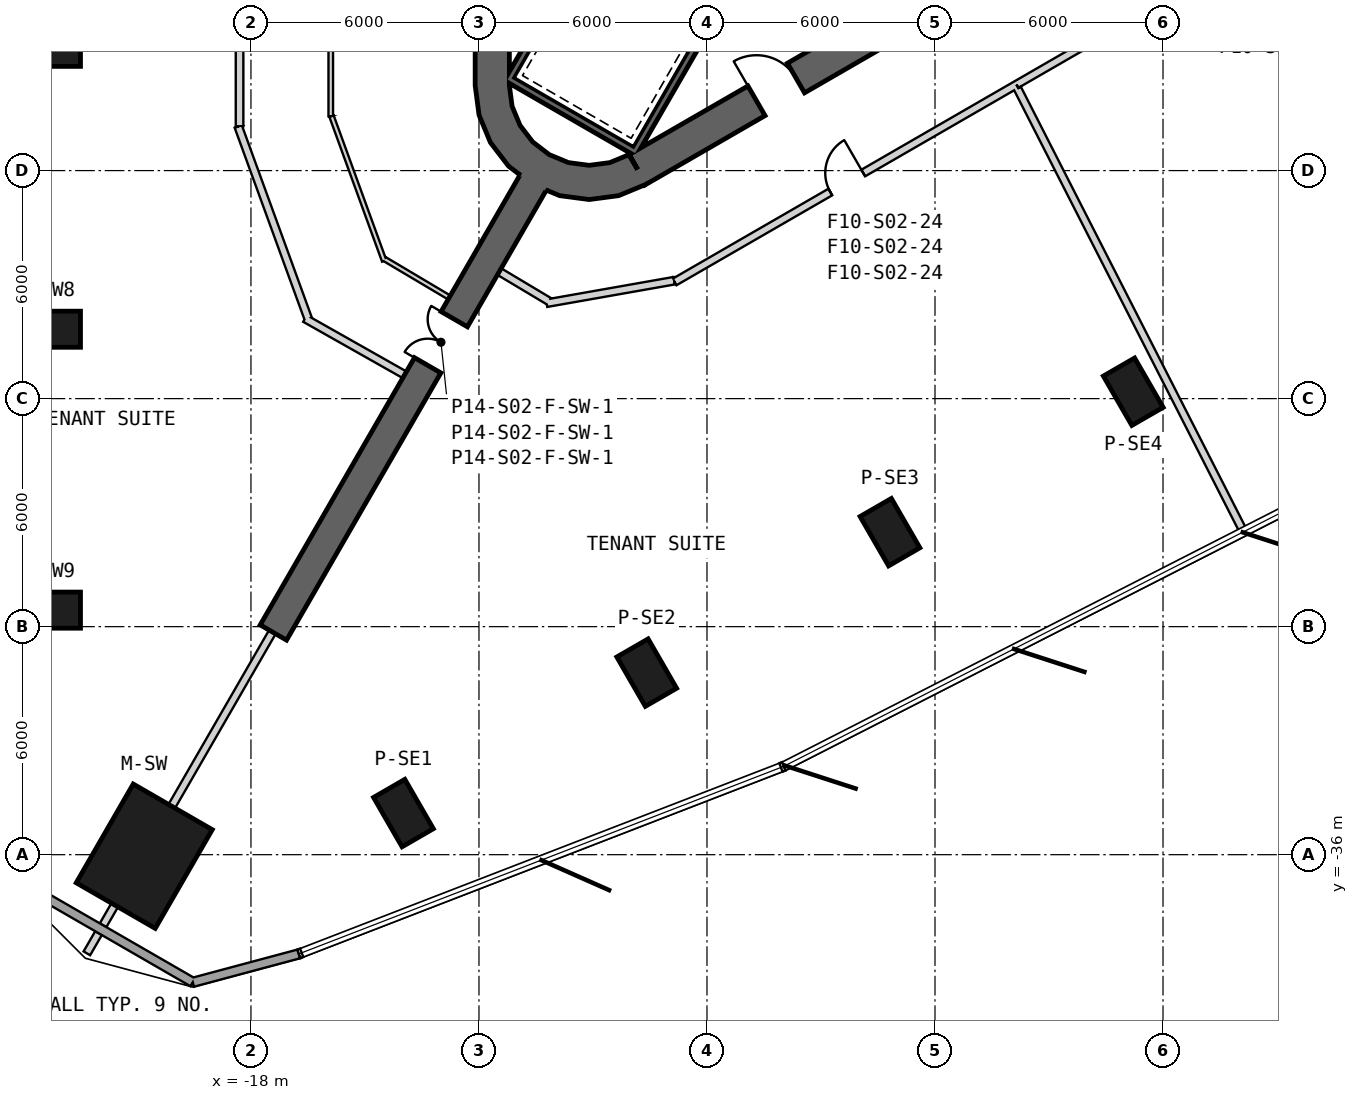
"""IFC4 building model, lengths in metres.
Left out: names, types, materials, properties, quantities, classifications, styles, units other than length and angle.
Written with IfcOpenShell. Run it as: python <this file> out.ifc"""

import sys

from ifc_helpers import new_model, si_unit, direction, frame, frame_2d, origin, origin_2d, place, context, subcontext, project, spatial, polyline, rectangle, outline, extrude, element, fill, save


model = new_model("IFC4")
c1 = context("Model", 3, precision=1e-05, world=origin(), true_north=direction((0.0, 1.0)))
c2 = subcontext(c1, "Body", "Model", "MODEL_VIEW")
j1 = project(units=[si_unit("LENGTHUNIT", "METRE"), si_unit("PLANEANGLEUNIT", "RADIAN")], contexts=[c1])
p1 = place(None, origin())
s1 = spatial("IfcSite", under=j1, at=p1, CompositionType="ELEMENT")
p2 = place(p1, origin())
s2 = spatial("IfcBuilding", under=s1, at=p2, CompositionType="ELEMENT")
p3 = place(p2, frame((0.0, 0.0, 70.1)))
s3 = spatial("IfcBuildingStorey", under=s2, at=p3, CompositionType="ELEMENT", Elevation=70.1)
p4 = place(p3, frame((-20.808, -36.041, 0.0), z_axis=(0.0, 0.0, 1.0), x_axis=(-0.5, -0.866025403784, 0.0)))
e1 = element("IfcColumn", 1, at=p4, inside=s3, PredefinedType="COLUMN", context=c2, shape_type="SweptSolid", body=[
    extrude(rectangle(XDim=3.0, YDim=2.4, at=origin_2d()), origin(), (0.0, 0.0, 1.0), 4.1),
])
for number, where, z_axis, x_axis in (
    (2, (-23.236, -14.783, 0.0), (0.0, 0.0, 1.0), (-1.0, 0.0, 0.0)),
    (3, (-23.236, -22.174, 0.0), (0.0, 0.0, 1.0), (-1.0, 0.0, 0.0)),
    (4, (-23.236, -29.566, 0.0), (0.0, 0.0, 1.0), (-1.0, 0.0, 0.0)),
    (5, (-13.987, -34.906, 0.0), (0.0, 0.0, 1.0), (0.5, -0.866, 0.0)),
    (6, (-7.586, -31.21, 0.0), (0.0, 0.0, 1.0), (0.5, -0.866, 0.0)),
    (7, (-1.185, -27.514, 0.0), (0.0, 0.0, 1.0), (0.5, -0.866, 0.0)),
    (8, (5.217, -23.818, 0.0), (0.0, 0.0, 1.0), (0.5, -0.866, 0.0)),
):
    element("IfcColumn", number, at=place(p3, frame(where, z_axis=z_axis, x_axis=x_axis)), inside=s3, PredefinedType="COLUMN", context=c2, shape_type="SweptSolid", body=[
        extrude(rectangle(XDim=1.5, YDim=0.95, at=origin_2d()), origin(), (0.0, 0.0, 1.0), 4.1),
    ])
p5 = place(p3, frame((-11.65, 15.762, 0.0), z_axis=(0.0, 0.0, 1.0), x_axis=(0.0, -1.0, 0.0)))
e9 = element("IfcWall", 9, at=p5, inside=s3, PredefinedType="SHEAR", context=c2, shape_type="SweptSolid", body=[
    extrude(rectangle(XDim=31.523, YDim=0.9, at=frame_2d((15.762, 0.0))), origin(), (0.0, 0.0, 1.0), 4.1),
])
p6 = place(p5, frame((7.062, 0.0, 0.0)))
e10 = element("IfcOpeningElement", 10, at=p6, cuts=e9, PredefinedType="OPENING", context=c2, shape_type="SweptSolid", body=[
    extrude(rectangle(XDim=1.2, YDim=2.4, at=frame_2d((0.6, 1.2))), frame((0.0, 0.46, 0.0), z_axis=(0.0, -1.0, 0.0), x_axis=(1.0, 0.0, 0.0)), (0.0, 0.0, 1.0), 0.92),
])
p7 = place(p5, frame((9.762, 0.0, 0.0)))
e11 = element("IfcOpeningElement", 11, at=p7, cuts=e9, PredefinedType="OPENING", context=c2, shape_type="SweptSolid", body=[
    extrude(rectangle(XDim=1.2, YDim=2.4, at=frame_2d((0.6, 1.2))), frame((0.0, 0.46, 0.0), z_axis=(0.0, -1.0, 0.0), x_axis=(1.0, 0.0, 0.0)), (0.0, 0.0, 1.0), 0.92),
])
p8 = place(p5, frame((12.462, 0.0, 0.0)))
e12 = element("IfcOpeningElement", 12, at=p8, cuts=e9, PredefinedType="OPENING", context=c2, shape_type="SweptSolid", body=[
    extrude(rectangle(XDim=1.2, YDim=2.4, at=frame_2d((0.6, 1.2))), frame((0.0, 0.46, 0.0), z_axis=(0.0, -1.0, 0.0), x_axis=(1.0, 0.0, 0.0)), (0.0, 0.0, 1.0), 0.92),
])
p9 = place(p5, frame((15.162, 0.0, 0.0)))
e13 = element("IfcOpeningElement", 13, at=p9, cuts=e9, PredefinedType="OPENING", context=c2, shape_type="SweptSolid", body=[
    extrude(rectangle(XDim=1.2, YDim=2.4, at=frame_2d((0.6, 1.2))), frame((0.0, 0.46, 0.0), z_axis=(0.0, -1.0, 0.0), x_axis=(1.0, 0.0, 0.0)), (0.0, 0.0, 1.0), 0.92),
])
p10 = place(p5, frame((17.862, 0.0, 0.0)))
e14 = element("IfcOpeningElement", 14, at=p10, cuts=e9, PredefinedType="OPENING", context=c2, shape_type="SweptSolid", body=[
    extrude(rectangle(XDim=1.2, YDim=2.4, at=frame_2d((0.6, 1.2))), frame((0.0, 0.46, 0.0), z_axis=(0.0, -1.0, 0.0), x_axis=(1.0, 0.0, 0.0)), (0.0, 0.0, 1.0), 0.92),
])
p11 = place(p5, frame((20.562, 0.0, 0.0)))
e15 = element("IfcOpeningElement", 15, at=p11, cuts=e9, PredefinedType="OPENING", context=c2, shape_type="SweptSolid", body=[
    extrude(rectangle(XDim=1.2, YDim=2.4, at=frame_2d((0.6, 1.2))), frame((0.0, 0.46, 0.0), z_axis=(0.0, -1.0, 0.0), x_axis=(1.0, 0.0, 0.0)), (0.0, 0.0, 1.0), 0.92),
])
p12 = place(p5, frame((23.262, 0.0, 0.0)))
e16 = element("IfcOpeningElement", 16, at=p12, cuts=e9, PredefinedType="OPENING", context=c2, shape_type="SweptSolid", body=[
    extrude(rectangle(XDim=1.2, YDim=2.4, at=frame_2d((0.6, 1.2))), frame((0.0, 0.46, 0.0), z_axis=(0.0, -1.0, 0.0), x_axis=(1.0, 0.0, 0.0)), (0.0, 0.0, 1.0), 0.92),
])
p13 = place(p5, frame((3.612, 0.0, 0.0)))
e17 = element("IfcOpeningElement", 17, at=p13, cuts=e9, PredefinedType="OPENING", context=c2, shape_type="SweptSolid", body=[
    extrude(rectangle(XDim=1.2, YDim=2.4, at=frame_2d((0.6, 1.2))), frame((0.0, 0.46, 0.0), z_axis=(0.0, -1.0, 0.0), x_axis=(1.0, 0.0, 0.0)), (0.0, 0.0, 1.0), 0.92),
])
p14 = place(p5, frame((26.712, 0.0, 0.0)))
e18 = element("IfcOpeningElement", 18, at=p14, cuts=e9, PredefinedType="OPENING", context=c2, shape_type="SweptSolid", body=[
    extrude(rectangle(XDim=1.2, YDim=2.4, at=frame_2d((0.6, 1.2))), frame((0.0, 0.46, 0.0), z_axis=(0.0, -1.0, 0.0), x_axis=(1.0, 0.0, 0.0)), (0.0, 0.0, 1.0), 0.92),
])
p15 = place(p3, frame((-7.825, -17.97, 0.0), z_axis=(0.0, 0.0, 1.0), x_axis=(0.866028369851, 0.499994862586, 0.0)))
e19 = element("IfcWall", 19, at=p15, inside=s3, PredefinedType="SHEAR", context=c2, shape_type="SweptSolid", body=[
    extrude(rectangle(XDim=31.523, YDim=0.9, at=frame_2d((15.762, 0.0))), origin(), (0.0, 0.0, 1.0), 4.1),
])
p16 = place(p15, frame((7.062, 0.0, 0.0)))
e20 = element("IfcOpeningElement", 20, at=p16, cuts=e19, PredefinedType="OPENING", context=c2, shape_type="SweptSolid", body=[
    extrude(rectangle(XDim=1.2, YDim=2.4, at=frame_2d((0.6, 1.2))), frame((0.0, 0.46, 0.0), z_axis=(0.0, -1.0, 0.0), x_axis=(1.0, 0.0, 0.0)), (0.0, 0.0, 1.0), 0.92),
])
p17 = place(p15, frame((9.762, 0.0, 0.0)))
e21 = element("IfcOpeningElement", 21, at=p17, cuts=e19, PredefinedType="OPENING", context=c2, shape_type="SweptSolid", body=[
    extrude(rectangle(XDim=1.2, YDim=2.4, at=frame_2d((0.6, 1.2))), frame((0.0, 0.46, 0.0), z_axis=(0.0, -1.0, 0.0), x_axis=(1.0, 0.0, 0.0)), (0.0, 0.0, 1.0), 0.92),
])
p18 = place(p15, frame((12.462, 0.0, 0.0)))
e22 = element("IfcOpeningElement", 22, at=p18, cuts=e19, PredefinedType="OPENING", context=c2, shape_type="SweptSolid", body=[
    extrude(rectangle(XDim=1.2, YDim=2.4, at=frame_2d((0.6, 1.2))), frame((0.0, 0.46, 0.0), z_axis=(0.0, -1.0, 0.0), x_axis=(1.0, 0.0, 0.0)), (0.0, 0.0, 1.0), 0.92),
])
p19 = place(p15, frame((15.162, 0.0, 0.0)))
e23 = element("IfcOpeningElement", 23, at=p19, cuts=e19, PredefinedType="OPENING", context=c2, shape_type="SweptSolid", body=[
    extrude(rectangle(XDim=1.2, YDim=2.4, at=frame_2d((0.6, 1.2))), frame((0.0, 0.46, 0.0), z_axis=(0.0, -1.0, 0.0), x_axis=(1.0, 0.0, 0.0)), (0.0, 0.0, 1.0), 0.92),
])
p20 = place(p15, frame((17.862, 0.0, 0.0)))
e24 = element("IfcOpeningElement", 24, at=p20, cuts=e19, PredefinedType="OPENING", context=c2, shape_type="SweptSolid", body=[
    extrude(rectangle(XDim=1.2, YDim=2.4, at=frame_2d((0.6, 1.2))), frame((0.0, 0.46, 0.0), z_axis=(0.0, -1.0, 0.0), x_axis=(1.0, 0.0, 0.0)), (0.0, 0.0, 1.0), 0.92),
])
p21 = place(p15, frame((20.562, 0.0, 0.0)))
e25 = element("IfcOpeningElement", 25, at=p21, cuts=e19, PredefinedType="OPENING", context=c2, shape_type="SweptSolid", body=[
    extrude(rectangle(XDim=1.2, YDim=2.4, at=frame_2d((0.6, 1.2))), frame((0.0, 0.46, 0.0), z_axis=(0.0, -1.0, 0.0), x_axis=(1.0, 0.0, 0.0)), (0.0, 0.0, 1.0), 0.92),
])
p22 = place(p15, frame((26.712, 0.0, 0.0)))
e26 = element("IfcOpeningElement", 26, at=p22, cuts=e19, PredefinedType="OPENING", context=c2, shape_type="SweptSolid", body=[
    extrude(rectangle(XDim=1.2, YDim=2.4, at=frame_2d((0.6, 1.2))), frame((0.0, 0.46, 0.0), z_axis=(0.0, -1.0, 0.0), x_axis=(1.0, 0.0, 0.0)), (0.0, 0.0, 1.0), 0.92),
])
p23 = place(p15, frame((3.612, 0.0, 0.0)))
e27 = element("IfcOpeningElement", 27, at=p23, cuts=e19, PredefinedType="OPENING", context=c2, shape_type="SweptSolid", body=[
    extrude(rectangle(XDim=1.2, YDim=2.4, at=frame_2d((0.6, 1.2))), frame((0.0, 0.46, 0.0), z_axis=(0.0, -1.0, 0.0), x_axis=(1.0, 0.0, 0.0)), (0.0, 0.0, 1.0), 0.92),
])
p24 = place(p3, origin())
e28 = element("IfcWall", 28, at=p24, inside=s3, PredefinedType="SHEAR", context=c2, shape_type="SweptSolid", body=[
    extrude(outline(polyline([(-12.1, -15.762), (-11.998, -16.538), (-11.698, -17.262), (-11.221, -17.883), (-10.6, -18.36), (-9.876, -18.659), (-9.1, -18.762), (-8.323, -18.659), (-7.6, -18.36), (-8.05, -17.58), (-8.556, -17.79), (-9.1, -17.862), (-9.644, -17.79), (-10.15, -17.58), (-10.585, -17.247), (-10.919, -16.812), (-11.128, -16.305), (-11.2, -15.762), (-12.1, -15.762)])), origin(), (0.0, 0.0, 1.0), 4.1),
])
p25 = place(p3, frame((-10.575, -18.316, 0.0), z_axis=(0.0, 0.0, 1.0), x_axis=(-0.499998162141, -0.86602646487, 0.0)))
e29 = element("IfcWall", 29, at=p25, inside=s3, PredefinedType="SHEAR", context=c2, shape_type="SweptSolid", body=[
    extrude(rectangle(XDim=13.669, YDim=0.8, at=frame_2d((6.835, 0.0))), origin(), (0.0, 0.0, 1.0), 4.1),
])
p26 = place(p25, frame((4.15, 0.0, 0.0)))
e30 = element("IfcOpeningElement", 30, at=p26, cuts=e29, PredefinedType="OPENING", context=c2, shape_type="SweptSolid", body=[
    extrude(rectangle(XDim=1.4, YDim=2.4, at=frame_2d((0.7, 1.2))), frame((0.0, 0.41, 0.0), z_axis=(0.0, -1.0, 0.0), x_axis=(1.0, 0.0, 0.0)), (0.0, 0.0, 1.0), 0.82),
])
p27 = place(p3, frame((-24.32, -36.593, 0.0), z_axis=(0.0, 0.0, 1.0), x_axis=(0.866017993231, -0.500012835235, 0.0)))
e31 = element("IfcWall", 31, at=p27, inside=s3, PredefinedType="SOLIDWALL", context=c2, shape_type="SweptSolid", body=[
    extrude(rectangle(XDim=5.531, YDim=0.24, at=frame_2d((2.766, 0.0))), origin(), (0.0, 0.0, 1.0), 3.8),
])
p28 = place(p3, frame((-19.53, -39.359, 0.0), z_axis=(0.0, 0.0, 1.0), x_axis=(0.965912964575, 0.258867040904, 0.0)))
e32 = element("IfcWall", 32, at=p28, inside=s3, PredefinedType="SOLIDWALL", context=c2, shape_type="SweptSolid", body=[
    extrude(rectangle(XDim=2.889, YDim=0.24, at=frame_2d((1.444, 0.0))), origin(), (0.0, 0.0, 1.0), 3.8),
])
p29 = place(p3, frame((-3.905, -10.563, -0.3), z_axis=(0.0, 0.0, 1.0), x_axis=(-0.500012932018, -0.866017937352, 0.0)))
e33 = element("IfcWall", 33, at=p29, inside=s3, PredefinedType="SHEAR", context=c2, shape_type="SweptSolid", body=[
    extrude(rectangle(XDim=8.1, YDim=0.2, at=frame_2d((4.05, 0.0))), origin(), (0.0, 0.0, 1.0), 4.1),
])
p30 = place(p3, frame((-11.282, -15.541, -0.3), z_axis=(0.0, 0.0, 1.0), x_axis=(0.866000483506, -0.500043160704, 0.0)))
e34 = element("IfcWall", 34, at=p30, inside=s3, PredefinedType="SHEAR", context=c2, shape_type="SweptSolid", body=[
    extrude(rectangle(XDim=3.8, YDim=0.2, at=frame_2d((1.9, 0.0))), origin(), (0.0, 0.0, 1.0), 4.1),
])
p31 = place(p3, frame((-7.196, -8.663, -0.3), z_axis=(0.0, 0.0, 1.0), x_axis=(-0.499997992926, -0.866026562566, 0.0)))
e35 = element("IfcWall", 35, at=p31, inside=s3, PredefinedType="SHEAR", context=c2, shape_type="SweptSolid", body=[
    extrude(rectangle(XDim=7.9, YDim=0.2, at=frame_2d((3.95, 0.0))), origin(), (0.0, 0.0, 1.0), 4.1),
])
p32 = place(p3, frame((-15.9, 16.451, 0.0), z_axis=(0.0, 0.0, 1.0), x_axis=(0.0, -1.0, 0.0)))
e36 = element("IfcWall", 36, at=p32, inside=s3, PredefinedType="PARTITIONING", context=c2, shape_type="SweptSolid", body=[
    extrude(rectangle(XDim=33.022, YDim=0.12, at=frame_2d((16.511, 0.0))), origin(), (0.0, 0.0, 1.0), 2.98),
])
p33 = place(p32, frame((15.981, 0.0, 0.0)))
e37 = element("IfcOpeningElement", 37, at=p33, cuts=e36, PredefinedType="OPENING", context=c2, shape_type="SweptSolid", body=[
    extrude(rectangle(XDim=1.0, YDim=2.1, at=frame_2d((0.5, 1.05))), frame((0.0, 0.07, 0.0), z_axis=(0.0, -1.0, 0.0), x_axis=(1.0, 0.0, 0.0)), (0.0, 0.0, 1.0), 0.14),
])
p34 = place(p3, frame((-15.879, -16.567, 0.0), z_axis=(0.0, 0.0, 1.0), x_axis=(0.341999322503, -0.939700198685, 0.0)))
e38 = element("IfcWall", 38, at=p34, inside=s3, PredefinedType="PARTITIONING", context=c2, shape_type="SweptSolid", body=[
    extrude(rectangle(XDim=4.054, YDim=0.12, at=frame_2d((2.027, 0.0))), origin(), (0.0, 0.0, 1.0), 2.88),
])
p35 = place(p3, frame((-14.494, -20.322, 0.0), z_axis=(0.0, 0.0, 1.0), x_axis=(0.859745408261, -0.510722853389, 0.0)))
e39 = element("IfcWall", 39, at=p35, inside=s3, PredefinedType="PARTITIONING", context=c2, shape_type="SweptSolid", body=[
    extrude(rectangle(XDim=1.991, YDim=0.12, at=frame_2d((0.996, 0.0))), origin(), (0.0, 0.0, 1.0), 3.8),
])
p36 = place(p3, frame((-16.576, -21.892, 0.0), z_axis=(0.0, 0.0, 1.0), x_axis=(0.870559817111, -0.492062602553, 0.0)))
e40 = element("IfcWall", 40, at=p36, inside=s3, PredefinedType="PARTITIONING", context=c2, shape_type="SweptSolid", body=[
    extrude(rectangle(XDim=3.01, YDim=0.2, at=frame_2d((1.505, 0.0))), origin(), (0.0, 0.0, 1.0), 3.8),
])
p37 = place(p3, frame((-18.334, -16.84, 0.0), z_axis=(0.0, 0.0, 1.0), x_axis=(0.342015877493, -0.939694173411, 0.0)))
e41 = element("IfcWall", 41, at=p37, inside=s3, PredefinedType="PARTITIONING", context=c2, shape_type="SweptSolid", body=[
    extrude(rectangle(XDim=5.389, YDim=0.2, at=frame_2d((2.694, 0.0))), origin(), (0.0, 0.0, 1.0), 2.88),
])
p38 = place(p3, frame((-18.3, 6.199, 0.0), z_axis=(0.0, 0.0, 1.0), x_axis=(0.0, -1.0, 0.0)))
e42 = element("IfcWall", 42, at=p38, inside=s3, PredefinedType="PARTITIONING", context=c2, shape_type="SweptSolid", body=[
    extrude(rectangle(XDim=23.033, YDim=0.2, at=frame_2d((11.517, 0.0))), origin(), (0.0, 0.0, 1.0), 3.08),
])
p39 = place(p38, frame((11.017, 0.0, 0.0)))
e43 = element("IfcOpeningElement", 43, at=p39, cuts=e42, PredefinedType="OPENING", context=c2, shape_type="SweptSolid", body=[
    extrude(rectangle(XDim=1.0, YDim=2.1, at=frame_2d((0.5, 1.05))), frame((0.0, 0.11, 0.0), z_axis=(0.0, -1.0, 0.0), x_axis=(1.0, 0.0, 0.0)), (0.0, 0.0, 1.0), 0.22),
])
p40 = place(p3, frame((-6.852, -20.93, 0.0), z_axis=(0.0, 0.0, 1.0), x_axis=(0.866021591072, 0.500006603753, 0.0)))
e44 = element("IfcWall", 44, at=p40, inside=s3, PredefinedType="PARTITIONING", context=c2, shape_type="SweptSolid", body=[
    extrude(rectangle(XDim=10.387, YDim=0.2, at=frame_2d((5.194, 0.0))), origin(), (0.0, 0.0, 1.0), 2.98),
])
p41 = place(p40, frame((4.732, 0.0, 0.0)))
e45 = element("IfcOpeningElement", 45, at=p41, cuts=e44, PredefinedType="OPENING", context=c2, shape_type="SweptSolid", body=[
    extrude(rectangle(XDim=1.0, YDim=2.1, at=frame_2d((0.5, 1.05))), frame((0.0, 0.11, 0.0), z_axis=(0.0, -1.0, 0.0), x_axis=(1.0, 0.0, 0.0)), (0.0, 0.0, 1.0), 0.22),
])
p42 = place(p3, frame((2.144, -15.737, 0.0), z_axis=(0.0, 0.0, 1.0), x_axis=(0.866019431537, 0.500010344094, 0.0)))
e46 = element("IfcWall", 46, at=p42, inside=s3, PredefinedType="PARTITIONING", context=c2, shape_type="SweptSolid", body=[
    extrude(rectangle(XDim=13.531, YDim=0.2, at=frame_2d((6.766, 0.0))), origin(), (0.0, 0.0, 1.0), 3.08),
])
p43 = place(p42, frame((6.254, 0.0, 0.0)))
e47 = element("IfcOpeningElement", 47, at=p43, cuts=e46, PredefinedType="OPENING", context=c2, shape_type="SweptSolid", body=[
    extrude(rectangle(XDim=1.0, YDim=2.1, at=frame_2d((0.5, 1.05))), frame((0.0, 0.11, 0.0), z_axis=(0.0, -1.0, 0.0), x_axis=(1.0, 0.0, 0.0)), (0.0, 0.0, 1.0), 0.22),
])
p44 = place(p3, frame((-10.22, -21.49, 0.0), z_axis=(0.0, 0.0, 1.0), x_axis=(0.984805188344, 0.173662721995, 0.0)))
e48 = element("IfcWall", 48, at=p44, inside=s3, PredefinedType="PARTITIONING", context=c2, shape_type="SweptSolid", body=[
    extrude(rectangle(XDim=3.408, YDim=0.2, at=frame_2d((1.704, 0.0))), origin(), (0.0, 0.0, 1.0), 2.88),
])
p45 = place(p3, frame((-11.465, -20.657, 0.0), z_axis=(0.0, 0.0, 1.0), x_axis=(0.858376755127, -0.513019830276, 0.0)))
e49 = element("IfcWall", 49, at=p45, inside=s3, PredefinedType="PARTITIONING", context=c2, shape_type="SweptSolid", body=[
    extrude(rectangle(XDim=1.533, YDim=0.2, at=frame_2d((0.767, 0.0))), origin(), (0.0, 0.0, 1.0), 3.8),
])
p46 = place(p3, frame((-22.318, -38.596, 0.0), z_axis=(0.0, 0.0, 1.0), x_axis=(0.500078582497, 0.865980029404, 0.0)))
e50 = element("IfcWall", 50, at=p46, inside=s3, PredefinedType="PARTITIONING", context=c2, shape_type="SweptSolid", body=[
    extrude(rectangle(XDim=0.613, YDim=0.2, at=frame_2d((0.307, 0.0))), origin(), (0.0, 0.0, 1.0), 3.8),
])
p47 = place(p3, frame((-21.891, -37.857, 0.0), z_axis=(0.0, 0.0, 1.0), x_axis=(0.49994015576, 0.866059952115, 0.0)))
e51 = element("IfcWall", 51, at=p47, inside=s3, PredefinedType="PARTITIONING", context=c2, shape_type="SweptSolid", body=[
    extrude(rectangle(XDim=0.615, YDim=0.2, at=frame_2d((0.307, 0.0))), origin(), (0.0, 0.0, 1.0), 3.8),
])
p48 = place(p3, frame((-20.084, -34.727, 0.0), z_axis=(0.0, 0.0, 1.0), x_axis=(0.499991120112, 0.86603053053, 0.0)))
e52 = element("IfcWall", 52, at=p48, inside=s3, PredefinedType="PARTITIONING", context=c2, shape_type="SweptSolid", body=[
    extrude(rectangle(XDim=5.296, YDim=0.2, at=frame_2d((2.648, 0.0))), origin(), (0.0, 0.0, 1.0), 3.37),
])
p49 = place(p3, frame((8.121, -27.503, 0.0), z_axis=(0.0, 0.0, 1.0), x_axis=(-0.454409665836, 0.890792824171, 0.0)))
e53 = element("IfcWall", 53, at=p49, inside=s3, PredefinedType="PARTITIONING", context=c2, shape_type="SweptSolid", body=[
    extrude(rectangle(XDim=13.096, YDim=0.2, at=frame_2d((6.548, 0.0))), origin(), (0.0, 0.0, 1.0), 3.08),
])
p50 = place(p41, origin())
e54 = element("IfcDoor", 54, at=p50, inside=s3, OperationType="SINGLE_SWING_LEFT", PredefinedType="USERDEFINED", context=c2, shape_type="SweptSolid", body=[
    extrude(rectangle(XDim=1.0, YDim=2.1, at=frame_2d((0.5, 1.05))), frame((0.0, 0.025, 0.0), z_axis=(0.0, -1.0, 0.0), x_axis=(1.0, 0.0, 0.0)), (0.0, 0.0, 1.0), 0.05),
])
fill(e45, e54)
p51 = place(p23, origin())
e55 = element("IfcDoor", 55, at=p51, inside=s3, OperationType="SINGLE_SWING_LEFT", PredefinedType="USERDEFINED", context=c2, shape_type="SweptSolid", body=[
    extrude(rectangle(XDim=1.2, YDim=2.4, at=frame_2d((0.6, 1.2))), frame((0.0, 0.025, 0.0), z_axis=(0.0, -1.0, 0.0), x_axis=(1.0, 0.0, 0.0)), (0.0, 0.0, 1.0), 0.05),
])
fill(e27, e55)
p52 = place(p26, origin())
e56 = element("IfcDoor", 56, at=p52, inside=s3, OperationType="DOUBLE_DOOR_SINGLE_SWING", PredefinedType="NOTDEFINED", context=c2, shape_type="SweptSolid", body=[
    extrude(rectangle(XDim=1.4, YDim=2.4, at=frame_2d((0.7, 1.2))), frame((0.0, 0.025, 0.0), z_axis=(0.0, -1.0, 0.0), x_axis=(1.0, 0.0, 0.0)), (0.0, 0.0, 1.0), 0.05),
])
fill(e30, e56)
save(model, sys.argv[1])
